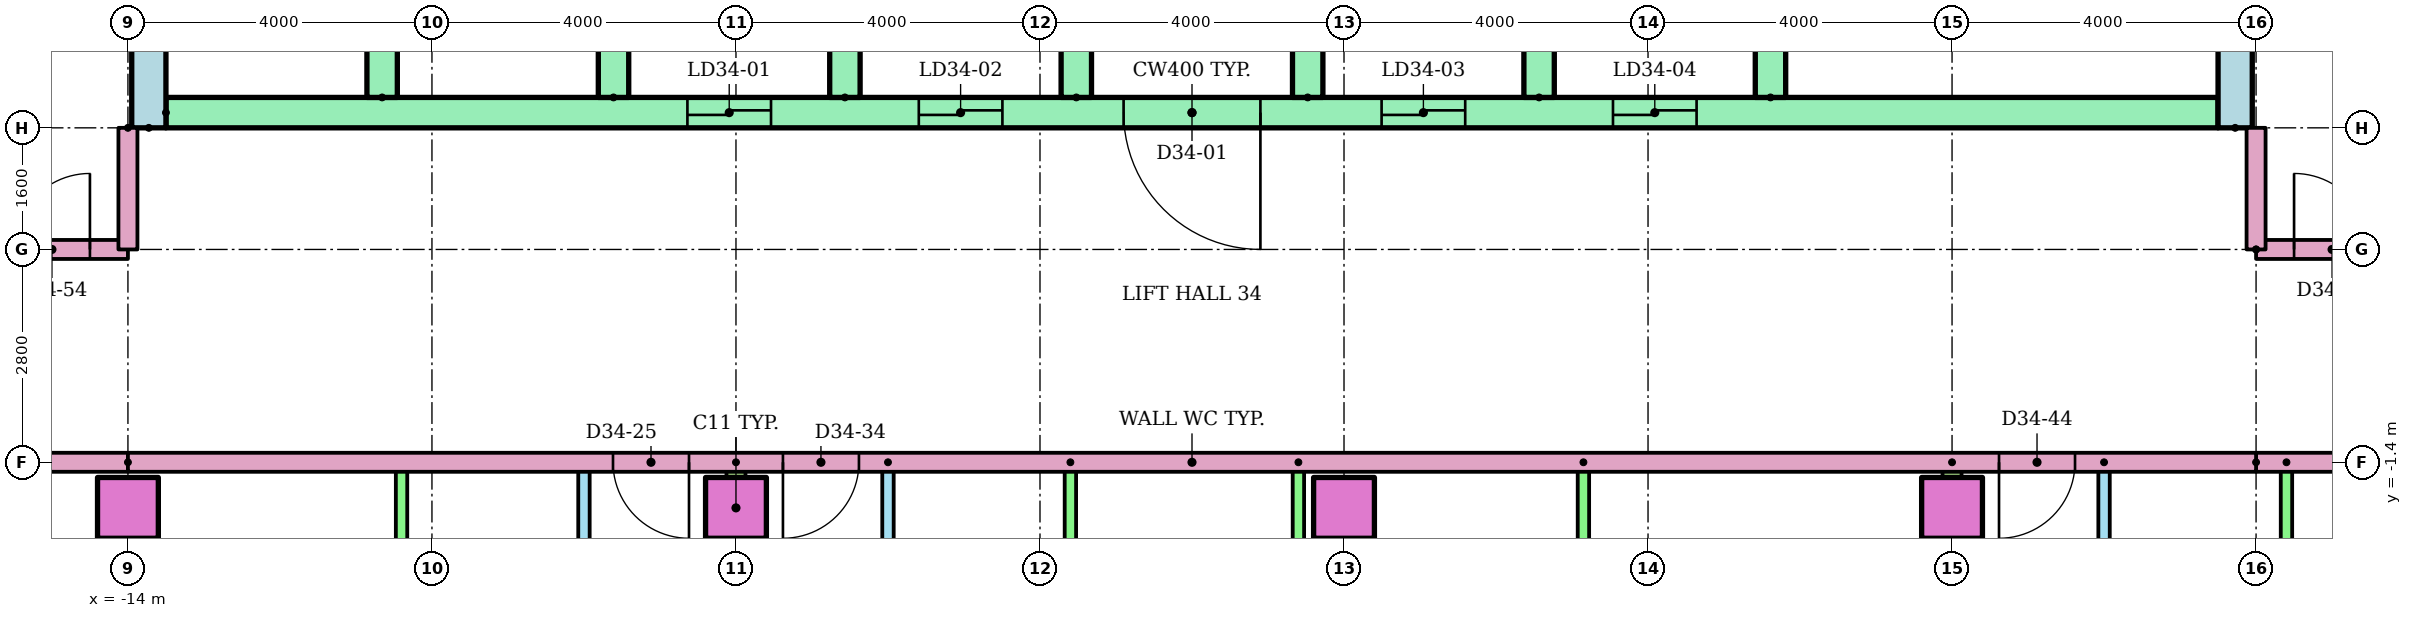
"""IFC4 building model, lengths in metres.
Left out: names, types, materials, properties, quantities, classifications, styles, units other than length and angle.
Written with IfcOpenShell. Run it as: python <this file> out.ifc"""

import sys

from ifc_helpers import new_model, si_unit, direction, frame, frame_2d, origin, origin_2d, place, context, subcontext, project, spatial, rectangle, extrude, element, fill, save


model = new_model("IFC4")
c1 = context("Model", 3, precision=1e-05, world=origin(), true_north=direction((0.0, 1.0)))
c2 = subcontext(c1, "Body", "Model", "MODEL_VIEW")
j1 = project(units=[si_unit("LENGTHUNIT", "METRE"), si_unit("PLANEANGLEUNIT", "RADIAN")], contexts=[c1])
p1 = place(None, origin())
s1 = spatial("IfcSite", under=j1, at=p1, CompositionType="ELEMENT")
p2 = place(p1, origin())
s2 = spatial("IfcBuilding", under=s1, at=p2, CompositionType="ELEMENT")
p3 = place(p2, frame((0.0, 0.0, 132.6)))
s3 = spatial("IfcBuildingStorey", under=s2, at=p3, CompositionType="ELEMENT", Elevation=132.6)
for number, where in (
    (1, (-14.0, -2.0, 0.0)),
    (2, (-6.0, -2.0, 0.0)),
    (3, (2.0, -2.0, 0.0)),
    (4, (10.0, -2.0, 0.0)),
):
    element("IfcColumn", number, at=place(p3, frame(where)), inside=s3, PredefinedType="COLUMN", context=c2, shape_type="SweptSolid", body=[
        extrude(rectangle(XDim=0.8, YDim=0.8, at=origin_2d()), origin(), (0.0, 0.0, 1.0), 3.2),
    ])
for number, where, z_axis, x_axis in (
    (5, (-13.725, 3.0, 0.0), (0.0, 0.0, 1.0), (0.0, 1.0, 0.0)),
    (6, (13.725, 3.0, 0.0), (0.0, 0.0, 1.0), (0.0, 1.0, 0.0)),
):
    element("IfcWall", number, at=place(p3, frame(where, z_axis=z_axis, x_axis=x_axis)), inside=s3, PredefinedType="SHEAR", context=c2, shape_type="SweptSolid", body=[
        extrude(rectangle(XDim=17.0, YDim=0.45, at=frame_2d((8.5, 0.0))), origin(), (0.0, 0.0, 1.0), 2.92),
    ])
p4 = place(p3, frame((-13.5, 3.2, 0.0)))
e7 = element("IfcWall", 7, at=p4, inside=s3, PredefinedType="SHEAR", context=c2, shape_type="SweptSolid", body=[
    extrude(rectangle(XDim=27.0, YDim=0.4, at=frame_2d((13.5, 0.0))), origin(), (0.0, 0.0, 1.0), 2.92),
])
p5 = place(p4, frame((6.861, 0.0, 0.0)))
e8 = element("IfcOpeningElement", 8, at=p5, cuts=e7, PredefinedType="OPENING", context=c2, shape_type="SweptSolid", body=[
    extrude(rectangle(XDim=1.1, YDim=2.1, at=frame_2d((0.55, 1.05))), frame((0.0, 0.21, 0.0), z_axis=(0.0, -1.0, 0.0), x_axis=(1.0, 0.0, 0.0)), (0.0, 0.0, 1.0), 0.42),
])
p6 = place(p4, frame((9.906, 0.0, 0.0)))
e9 = element("IfcOpeningElement", 9, at=p6, cuts=e7, PredefinedType="OPENING", context=c2, shape_type="SweptSolid", body=[
    extrude(rectangle(XDim=1.1, YDim=2.1, at=frame_2d((0.55, 1.05))), frame((0.0, 0.21, 0.0), z_axis=(0.0, -1.0, 0.0), x_axis=(1.0, 0.0, 0.0)), (0.0, 0.0, 1.0), 0.42),
])
p7 = place(p4, frame((15.994, 0.0, 0.0)))
e10 = element("IfcOpeningElement", 10, at=p7, cuts=e7, PredefinedType="OPENING", context=c2, shape_type="SweptSolid", body=[
    extrude(rectangle(XDim=1.1, YDim=2.1, at=frame_2d((0.55, 1.05))), frame((0.0, 0.21, 0.0), z_axis=(0.0, -1.0, 0.0), x_axis=(1.0, 0.0, 0.0)), (0.0, 0.0, 1.0), 0.42),
])
p8 = place(p4, frame((19.039, 0.0, 0.0)))
e11 = element("IfcOpeningElement", 11, at=p8, cuts=e7, PredefinedType="OPENING", context=c2, shape_type="SweptSolid", body=[
    extrude(rectangle(XDim=1.1, YDim=2.1, at=frame_2d((0.55, 1.05))), frame((0.0, 0.21, 0.0), z_axis=(0.0, -1.0, 0.0), x_axis=(1.0, 0.0, 0.0)), (0.0, 0.0, 1.0), 0.42),
])
p9 = place(p4, frame((12.6, 0.0, 0.0)))
e12 = element("IfcOpeningElement", 12, at=p9, cuts=e7, PredefinedType="OPENING", context=c2, shape_type="SweptSolid", body=[
    extrude(rectangle(XDim=1.8, YDim=2.1, at=frame_2d((0.9, 1.05))), frame((0.0, 0.21, 0.0), z_axis=(0.0, -1.0, 0.0), x_axis=(1.0, 0.0, 0.0)), (0.0, 0.0, 1.0), 0.42),
])
for number, where, z_axis, x_axis in (
    (13, (-10.656, 3.4, 0.0), (0.0, 0.0, 1.0), (0.0, 1.0, 0.0)),
    (14, (-7.611, 3.4, 0.0), (0.0, 0.0, 1.0), (0.0, 1.0, 0.0)),
    (15, (-4.567, 3.4, 0.0), (0.0, 0.0, 1.0), (0.0, 1.0, 0.0)),
    (16, (-1.522, 3.4, 0.0), (0.0, 0.0, 1.0), (0.0, 1.0, 0.0)),
    (17, (1.522, 3.4, 0.0), (0.0, 0.0, 1.0), (0.0, 1.0, 0.0)),
    (18, (4.567, 3.4, 0.0), (0.0, 0.0, 1.0), (0.0, 1.0, 0.0)),
    (19, (7.611, 3.4, 0.0), (0.0, 0.0, 1.0), (0.0, 1.0, 0.0)),
):
    element("IfcWall", number, at=place(p3, frame(where, z_axis=z_axis, x_axis=x_axis)), inside=s3, PredefinedType="SHEAR", context=c2, shape_type="SweptSolid", body=[
        extrude(rectangle(XDim=3.0, YDim=0.4, at=frame_2d((1.5, 0.0))), origin(), (0.0, 0.0, 1.0), 2.92),
    ])
p10 = place(p3, frame((-8.0, -9.2, 0.0), z_axis=(0.0, 0.0, 1.0), x_axis=(0.0, 1.0, 0.0)))
e20 = element("IfcWall", 20, at=p10, inside=s3, PredefinedType="PARTITIONING", context=c2, shape_type="SweptSolid", body=[
    extrude(rectangle(XDim=7.8, YDim=0.15, at=frame_2d((3.9, 0.0))), origin(), (0.0, 0.0, 1.0), 2.4),
])
p11 = place(p10, frame((5.225, 0.0, 0.0)))
e21 = element("IfcOpeningElement", 21, at=p11, cuts=e20, PredefinedType="OPENING", context=c2, shape_type="SweptSolid", body=[
    extrude(rectangle(XDim=0.9, YDim=2.1, at=frame_2d((0.45, 1.05))), frame((0.0, 0.085, 0.0), z_axis=(0.0, -1.0, 0.0), x_axis=(1.0, 0.0, 0.0)), (0.0, 0.0, 1.0), 0.17),
])
p12 = place(p10, frame((1.375, 0.0, 0.0)))
e22 = element("IfcOpeningElement", 22, at=p12, cuts=e20, PredefinedType="OPENING", context=c2, shape_type="SweptSolid", body=[
    extrude(rectangle(XDim=0.8, YDim=2.1, at=frame_2d((0.4, 1.05))), frame((0.0, 0.085, 0.0), z_axis=(0.0, -1.0, 0.0), x_axis=(1.0, 0.0, 0.0)), (0.0, 0.0, 1.0), 0.17),
])
p13 = place(p3, frame((-10.4, -9.2, 0.0), z_axis=(0.0, 0.0, 1.0), x_axis=(0.0, 1.0, 0.0)))
e23 = element("IfcWall", 23, at=p13, inside=s3, PredefinedType="PARTITIONING", context=c2, shape_type="SweptSolid", body=[
    extrude(rectangle(XDim=7.8, YDim=0.15, at=frame_2d((3.9, 0.0))), origin(), (0.0, 0.0, 1.0), 2.4),
])
p14 = place(p3, frame((-4.0, -1.4, 0.0), z_axis=(0.0, 0.0, 1.0), x_axis=(0.0, -1.0, 0.0)))
e24 = element("IfcWall", 24, at=p14, inside=s3, PredefinedType="PARTITIONING", context=c2, shape_type="SweptSolid", body=[
    extrude(rectangle(XDim=7.8, YDim=0.15, at=frame_2d((3.9, 0.0))), origin(), (0.0, 0.0, 1.0), 2.4),
])
p15 = place(p14, frame((1.675, 0.0, 0.0)))
e25 = element("IfcOpeningElement", 25, at=p15, cuts=e24, PredefinedType="OPENING", context=c2, shape_type="SweptSolid", body=[
    extrude(rectangle(XDim=0.9, YDim=2.1, at=frame_2d((0.45, 1.05))), frame((0.0, 0.085, 0.0), z_axis=(0.0, -1.0, 0.0), x_axis=(1.0, 0.0, 0.0)), (0.0, 0.0, 1.0), 0.17),
])
p16 = place(p14, frame((5.625, 0.0, 0.0)))
e26 = element("IfcOpeningElement", 26, at=p16, cuts=e24, PredefinedType="OPENING", context=c2, shape_type="SweptSolid", body=[
    extrude(rectangle(XDim=0.8, YDim=2.1, at=frame_2d((0.4, 1.05))), frame((0.0, 0.085, 0.0), z_axis=(0.0, -1.0, 0.0), x_axis=(1.0, 0.0, 0.0)), (0.0, 0.0, 1.0), 0.17),
])
for number, where, z_axis, x_axis in (
    (27, (-1.6, -1.4, 0.0), (0.0, 0.0, 1.0), (0.0, -1.0, 0.0)),
    (28, (1.4, -1.4, 0.0), (0.0, 0.0, 1.0), (0.0, -1.0, 0.0)),
    (29, (5.15, -1.4, 0.0), (0.0, 0.0, 1.0), (0.0, -1.0, 0.0)),
):
    element("IfcWall", number, at=place(p3, frame(where, z_axis=z_axis, x_axis=x_axis)), inside=s3, PredefinedType="PARTITIONING", context=c2, shape_type="SweptSolid", body=[
        extrude(rectangle(XDim=7.8, YDim=0.15, at=frame_2d((3.9, 0.0))), origin(), (0.0, 0.0, 1.0), 2.4),
    ])
p17 = place(p3, frame((-6.0, -1.4, 0.0), z_axis=(0.0, 0.0, 1.0), x_axis=(0.0, -1.0, 0.0)))
e30 = element("IfcWall", 30, at=p17, inside=s3, PredefinedType="PARTITIONING", context=c2, shape_type="SweptSolid", body=[
    extrude(rectangle(XDim=14.91, YDim=0.25, at=frame_2d((7.455, 0.0))), origin(), (0.0, 0.0, 1.0), 2.4),
])
p18 = place(p3, frame((12.0, -1.4, 0.0), z_axis=(0.0, 0.0, 1.0), x_axis=(0.0, -1.0, 0.0)))
e31 = element("IfcWall", 31, at=p18, inside=s3, PredefinedType="PARTITIONING", context=c2, shape_type="SweptSolid", body=[
    extrude(rectangle(XDim=7.8, YDim=0.15, at=frame_2d((3.9, 0.0))), origin(), (0.0, 0.0, 1.0), 2.4),
])
p19 = place(p18, frame((1.675, 0.0, 0.0)))
e32 = element("IfcOpeningElement", 32, at=p19, cuts=e31, PredefinedType="OPENING", context=c2, shape_type="SweptSolid", body=[
    extrude(rectangle(XDim=0.9, YDim=2.1, at=frame_2d((0.45, 1.05))), frame((0.0, 0.085, 0.0), z_axis=(0.0, -1.0, 0.0), x_axis=(1.0, 0.0, 0.0)), (0.0, 0.0, 1.0), 0.17),
])
p20 = place(p18, frame((5.625, 0.0, 0.0)))
e33 = element("IfcOpeningElement", 33, at=p20, cuts=e31, PredefinedType="OPENING", context=c2, shape_type="SweptSolid", body=[
    extrude(rectangle(XDim=0.8, YDim=2.1, at=frame_2d((0.4, 1.05))), frame((0.0, 0.085, 0.0), z_axis=(0.0, -1.0, 0.0), x_axis=(1.0, 0.0, 0.0)), (0.0, 0.0, 1.0), 0.17),
])
p21 = place(p3, frame((14.4, -1.4, 0.0), z_axis=(0.0, 0.0, 1.0), x_axis=(0.0, -1.0, 0.0)))
e34 = element("IfcWall", 34, at=p21, inside=s3, PredefinedType="PARTITIONING", context=c2, shape_type="SweptSolid", body=[
    extrude(rectangle(XDim=7.8, YDim=0.15, at=frame_2d((3.9, 0.0))), origin(), (0.0, 0.0, 1.0), 2.4),
])
p22 = place(p3, frame((10.0, -1.4, 0.0), z_axis=(0.0, 0.0, 1.0), x_axis=(0.0, -1.0, 0.0)))
e35 = element("IfcWall", 35, at=p22, inside=s3, PredefinedType="PARTITIONING", context=c2, shape_type="SweptSolid", body=[
    extrude(rectangle(XDim=14.91, YDim=0.25, at=frame_2d((7.455, 0.0))), origin(), (0.0, 0.0, 1.0), 2.4),
])
for number, where, z_axis, x_axis in (
    (36, (-14.0, -1.4, 0.0), (0.0, 0.0, 1.0), (-1.0, 0.0, 0.0)),
    (37, (29.0, -1.4, 0.0), (0.0, 0.0, 1.0), (-1.0, 0.0, 0.0)),
):
    element("IfcWall", number, at=place(p3, frame(where, z_axis=z_axis, x_axis=x_axis)), inside=s3, PredefinedType="PARTITIONING", context=c2, shape_type="SweptSolid", body=[
        extrude(rectangle(XDim=15.0, YDim=0.25, at=frame_2d((7.5, 0.0))), origin(), (0.0, 0.0, 1.0), 2.4),
    ])
p23 = place(p3, frame((-29.0, 1.4, 0.0)))
e38 = element("IfcWall", 38, at=p23, inside=s3, PredefinedType="PARTITIONING", context=c2, shape_type="SweptSolid", body=[
    extrude(rectangle(XDim=15.0, YDim=0.25, at=frame_2d((7.5, 0.0))), origin(), (0.0, 0.0, 1.0), 2.4),
])
p24 = place(p23, frame((13.5, 0.0, 0.0)))
e39 = element("IfcOpeningElement", 39, at=p24, cuts=e38, PredefinedType="OPENING", context=c2, shape_type="SweptSolid", body=[
    extrude(rectangle(XDim=1.0, YDim=2.1, at=frame_2d((0.5, 1.05))), frame((0.0, 0.135, 0.0), z_axis=(0.0, -1.0, 0.0), x_axis=(1.0, 0.0, 0.0)), (0.0, 0.0, 1.0), 0.27),
])
p25 = place(p3, frame((14.0, 1.4, 0.0)))
e40 = element("IfcWall", 40, at=p25, inside=s3, PredefinedType="PARTITIONING", context=c2, shape_type="SweptSolid", body=[
    extrude(rectangle(XDim=15.0, YDim=0.25, at=frame_2d((7.5, 0.0))), origin(), (0.0, 0.0, 1.0), 2.4),
])
p26 = place(p25, frame((0.5, 0.0, 0.0)))
e41 = element("IfcOpeningElement", 41, at=p26, cuts=e40, PredefinedType="OPENING", context=c2, shape_type="SweptSolid", body=[
    extrude(rectangle(XDim=1.0, YDim=2.1, at=frame_2d((0.5, 1.05))), frame((0.0, 0.135, 0.0), z_axis=(0.0, -1.0, 0.0), x_axis=(1.0, 0.0, 0.0)), (0.0, 0.0, 1.0), 0.27),
])
p27 = place(p3, frame((14.0, -1.4, 0.0), z_axis=(0.0, 0.0, 1.0), x_axis=(-1.0, 0.0, 0.0)))
e42 = element("IfcWall", 42, at=p27, inside=s3, PredefinedType="PARTITIONING", context=c2, shape_type="SweptSolid", body=[
    extrude(rectangle(XDim=28.0, YDim=0.25, at=frame_2d((14.0, 0.0))), origin(), (0.0, 0.0, 1.0), 2.4),
])
p28 = place(p27, frame((20.618, 0.0, 0.0)))
e43 = element("IfcOpeningElement", 43, at=p28, cuts=e42, PredefinedType="OPENING", context=c2, shape_type="SweptSolid", body=[
    extrude(rectangle(XDim=1.0, YDim=2.1, at=frame_2d((0.5, 1.05))), frame((0.0, 0.135, 0.0), z_axis=(0.0, -1.0, 0.0), x_axis=(1.0, 0.0, 0.0)), (0.0, 0.0, 1.0), 0.27),
])
p29 = place(p27, frame((18.382, 0.0, 0.0)))
e44 = element("IfcOpeningElement", 44, at=p29, cuts=e42, PredefinedType="OPENING", context=c2, shape_type="SweptSolid", body=[
    extrude(rectangle(XDim=1.0, YDim=2.1, at=frame_2d((0.5, 1.05))), frame((0.0, 0.135, 0.0), z_axis=(0.0, -1.0, 0.0), x_axis=(1.0, 0.0, 0.0)), (0.0, 0.0, 1.0), 0.27),
])
p30 = place(p27, frame((2.382, 0.0, 0.0)))
e45 = element("IfcOpeningElement", 45, at=p30, cuts=e42, PredefinedType="OPENING", context=c2, shape_type="SweptSolid", body=[
    extrude(rectangle(XDim=1.0, YDim=2.1, at=frame_2d((0.5, 1.05))), frame((0.0, 0.135, 0.0), z_axis=(0.0, -1.0, 0.0), x_axis=(1.0, 0.0, 0.0)), (0.0, 0.0, 1.0), 0.27),
])
for number, where, z_axis, x_axis in (
    (46, (-14.0, 3.0, 0.0), (0.0, 0.0, 1.0), (0.0, -1.0, 0.0)),
    (47, (14.0, 1.4, 0.0), (0.0, 0.0, 1.0), (0.0, 1.0, 0.0)),
):
    element("IfcWall", number, at=place(p3, frame(where, z_axis=z_axis, x_axis=x_axis)), inside=s3, PredefinedType="PARTITIONING", context=c2, shape_type="SweptSolid", body=[
        extrude(rectangle(XDim=1.6, YDim=0.25, at=frame_2d((0.8, 0.0))), origin(), (0.0, 0.0, 1.0), 2.4),
    ])
p31 = place(p5, origin())
e48 = element("IfcDoor", 48, at=p31, inside=s3, OperationType="SLIDING_TO_LEFT", PredefinedType="DOOR", context=c2, shape_type="SweptSolid", body=[
    extrude(rectangle(XDim=1.1, YDim=2.1, at=frame_2d((0.55, 1.05))), frame((0.0, 0.025, 0.0), z_axis=(0.0, -1.0, 0.0), x_axis=(1.0, 0.0, 0.0)), (0.0, 0.0, 1.0), 0.05),
])
fill(e8, e48)
p32 = place(p6, origin())
e49 = element("IfcDoor", 49, at=p32, inside=s3, OperationType="SLIDING_TO_LEFT", PredefinedType="DOOR", context=c2, shape_type="SweptSolid", body=[
    extrude(rectangle(XDim=1.1, YDim=2.1, at=frame_2d((0.55, 1.05))), frame((0.0, 0.025, 0.0), z_axis=(0.0, -1.0, 0.0), x_axis=(1.0, 0.0, 0.0)), (0.0, 0.0, 1.0), 0.05),
])
fill(e9, e49)
p33 = place(p7, origin())
e50 = element("IfcDoor", 50, at=p33, inside=s3, OperationType="SLIDING_TO_LEFT", PredefinedType="DOOR", context=c2, shape_type="SweptSolid", body=[
    extrude(rectangle(XDim=1.1, YDim=2.1, at=frame_2d((0.55, 1.05))), frame((0.0, 0.025, 0.0), z_axis=(0.0, -1.0, 0.0), x_axis=(1.0, 0.0, 0.0)), (0.0, 0.0, 1.0), 0.05),
])
fill(e10, e50)
p34 = place(p8, origin())
e51 = element("IfcDoor", 51, at=p34, inside=s3, OperationType="SLIDING_TO_LEFT", PredefinedType="DOOR", context=c2, shape_type="SweptSolid", body=[
    extrude(rectangle(XDim=1.1, YDim=2.1, at=frame_2d((0.55, 1.05))), frame((0.0, 0.025, 0.0), z_axis=(0.0, -1.0, 0.0), x_axis=(1.0, 0.0, 0.0)), (0.0, 0.0, 1.0), 0.05),
])
fill(e11, e51)
p35 = place(p9, frame((1.8, 0.0, 0.0), z_axis=(0.0, 0.0, 1.0), x_axis=(-1.0, 0.0, 0.0)))
e52 = element("IfcDoor", 52, at=p35, inside=s3, OperationType="DOUBLE_DOOR_SINGLE_SWING", PredefinedType="DOOR", context=c2, shape_type="SweptSolid", body=[
    extrude(rectangle(XDim=1.8, YDim=2.1, at=frame_2d((0.9, 1.05))), frame((0.0, 0.025, 0.0), z_axis=(0.0, -1.0, 0.0), x_axis=(1.0, 0.0, 0.0)), (0.0, 0.0, 1.0), 0.05),
])
fill(e12, e52)
p36 = place(p28, origin())
e53 = element("IfcDoor", 53, at=p36, inside=s3, OperationType="SINGLE_SWING_LEFT", PredefinedType="DOOR", context=c2, shape_type="SweptSolid", body=[
    extrude(rectangle(XDim=1.0, YDim=2.1, at=frame_2d((0.5, 1.05))), frame((0.0, 0.025, 0.0), z_axis=(0.0, -1.0, 0.0), x_axis=(1.0, 0.0, 0.0)), (0.0, 0.0, 1.0), 0.05),
])
fill(e43, e53)
p37 = place(p29, origin())
e54 = element("IfcDoor", 54, at=p37, inside=s3, OperationType="SINGLE_SWING_RIGHT", PredefinedType="DOOR", context=c2, shape_type="SweptSolid", body=[
    extrude(rectangle(XDim=1.0, YDim=2.1, at=frame_2d((0.5, 1.05))), frame((0.0, 0.025, 0.0), z_axis=(0.0, -1.0, 0.0), x_axis=(1.0, 0.0, 0.0)), (0.0, 0.0, 1.0), 0.05),
])
fill(e44, e54)
p38 = place(p30, origin())
e55 = element("IfcDoor", 55, at=p38, inside=s3, OperationType="SINGLE_SWING_RIGHT", PredefinedType="DOOR", context=c2, shape_type="SweptSolid", body=[
    extrude(rectangle(XDim=1.0, YDim=2.1, at=frame_2d((0.5, 1.05))), frame((0.0, 0.025, 0.0), z_axis=(0.0, -1.0, 0.0), x_axis=(1.0, 0.0, 0.0)), (0.0, 0.0, 1.0), 0.05),
])
fill(e45, e55)
p39 = place(p24, origin())
e56 = element("IfcDoor", 56, at=p39, inside=s3, OperationType="SINGLE_SWING_RIGHT", PredefinedType="DOOR", context=c2, shape_type="SweptSolid", body=[
    extrude(rectangle(XDim=1.0, YDim=2.1, at=frame_2d((0.5, 1.05))), frame((0.0, 0.025, 0.0), z_axis=(0.0, -1.0, 0.0), x_axis=(1.0, 0.0, 0.0)), (0.0, 0.0, 1.0), 0.05),
])
fill(e39, e56)
p40 = place(p26, origin())
e57 = element("IfcDoor", 57, at=p40, inside=s3, OperationType="SINGLE_SWING_LEFT", PredefinedType="DOOR", context=c2, shape_type="SweptSolid", body=[
    extrude(rectangle(XDim=1.0, YDim=2.1, at=frame_2d((0.5, 1.05))), frame((0.0, 0.025, 0.0), z_axis=(0.0, -1.0, 0.0), x_axis=(1.0, 0.0, 0.0)), (0.0, 0.0, 1.0), 0.05),
])
fill(e41, e57)
save(model, sys.argv[1])
